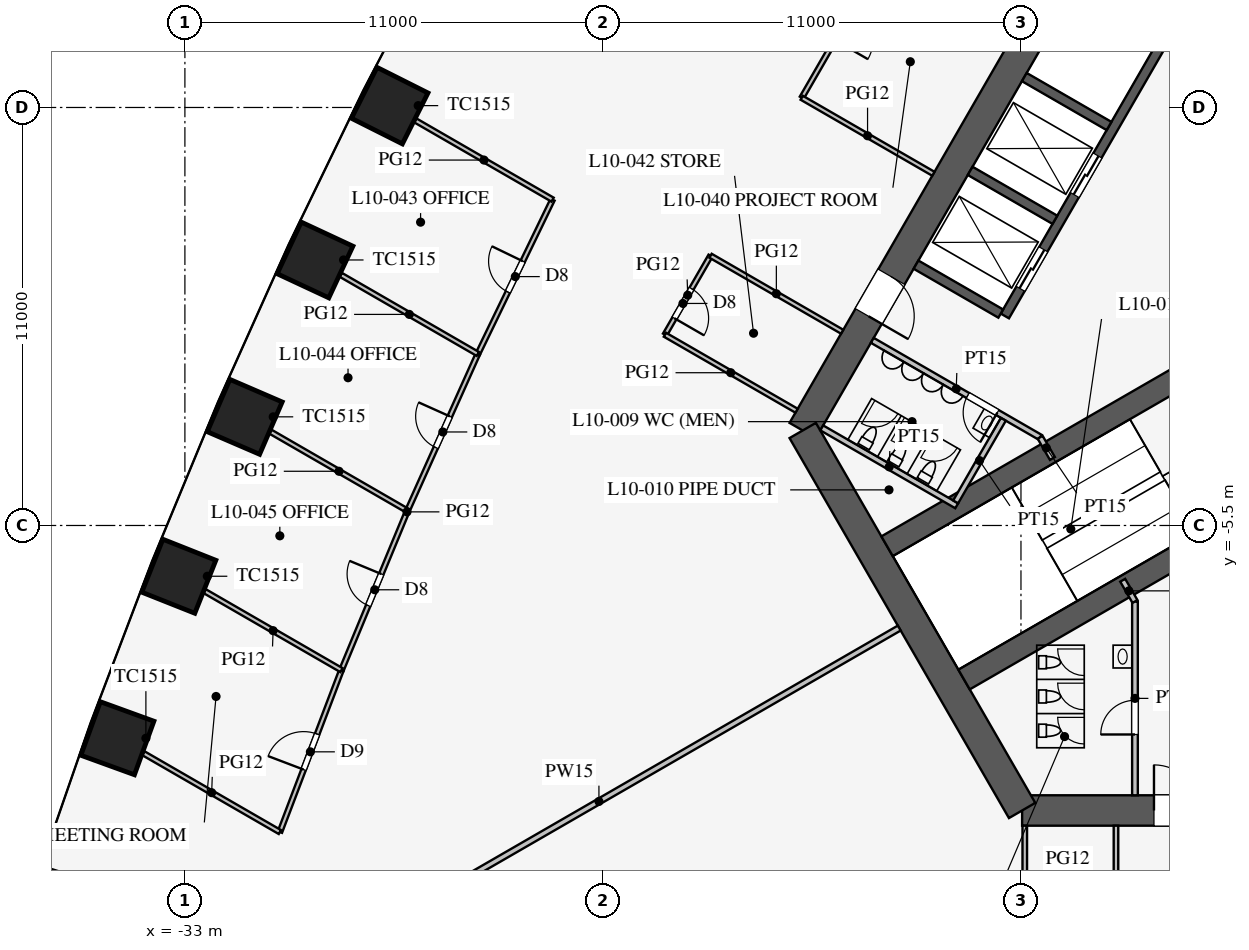
"""IFC4 building model, lengths in metres.
Left out: names, types, materials, properties, quantities, classifications, styles, units other than length and angle.
Written with IfcOpenShell. Run it as: python <this file> out.ifc"""

import sys

from ifc_helpers import new_model, si_unit, direction, frame, frame_2d, origin, origin_2d, place, context, subcontext, project, spatial, rectangle, extrude, element, fill, save


model = new_model("IFC4")
c1 = context("Model", 3, precision=1e-05, world=origin(), true_north=direction((0.0, 1.0)))
c2 = subcontext(c1, "Body", "Model", "MODEL_VIEW")
j1 = project(units=[si_unit("LENGTHUNIT", "METRE"), si_unit("PLANEANGLEUNIT", "RADIAN")], contexts=[c1])
p1 = place(None, origin())
s1 = spatial("IfcSite", under=j1, at=p1, CompositionType="ELEMENT")
p2 = place(p1, origin())
s2 = spatial("IfcBuilding", under=s1, at=p2, CompositionType="ELEMENT")
p3 = place(p2, frame((0.0, 0.0, 45.9)))
s3 = spatial("IfcBuildingStorey", under=s2, at=p3, CompositionType="ELEMENT", Elevation=45.9)
for number, where, z_axis, x_axis in (
    (1, (-27.611, 5.549, 0.0), (0.0, 0.0, 1.0), (-0.449, -0.894, 0.0)),
    (2, (-29.576, 1.487, 0.0), (0.0, 0.0, 1.0), (-0.423, -0.906, 0.0)),
    (3, (-31.426, -2.641, 0.0), (0.0, 0.0, 1.0), (-0.396, -0.918, 0.0)),
    (4, (-33.16, -6.836, 0.0), (0.0, 0.0, 1.0), (-0.369, -0.929, 0.0)),
    (5, (-34.776, -11.099, 0.0), (0.0, 0.0, 1.0), (-0.342, -0.94, 0.0)),
    (6, (-36.262, -15.438, 0.0), (0.0, 0.0, 1.0), (-0.3, -0.954, 0.0)),
):
    element("IfcColumn", number, at=place(p3, frame(where, z_axis=z_axis, x_axis=x_axis)), inside=s3, PredefinedType="COLUMN", context=c2, shape_type="SweptSolid", body=[
        extrude(rectangle(XDim=1.5, YDim=1.5, at=origin_2d()), origin(), (0.0, 0.0, 1.0), 4.2),
    ])
p4 = place(p3, frame((-10.97, -13.0, 0.0), z_axis=(0.0, 0.0, 1.0), x_axis=(1.0, 0.0, 0.0)))
e7 = element("IfcWall", 7, at=p4, inside=s3, PredefinedType="SHEAR", context=c2, shape_type="SweptSolid", body=[
    extrude(rectangle(XDim=21.939, YDim=0.8, at=frame_2d((10.97, 0.0))), origin(), (0.0, 0.0, 1.0), 4.2),
])
p5 = place(p4, frame((17.27, 0.0, 0.0)))
e8 = element("IfcOpeningElement", 8, at=p5, cuts=e7, PredefinedType="OPENING", context=c2, shape_type="SweptSolid", body=[
    extrude(rectangle(XDim=1.2, YDim=2.1, at=frame_2d((0.6, 1.05))), frame((0.0, 0.41, 0.0), z_axis=(0.0, -1.0, 0.0), x_axis=(1.0, 0.0, 0.0)), (0.0, 0.0, 1.0), 0.82),
])
p6 = place(p4, frame((3.47, 0.0, 0.0)))
e9 = element("IfcOpeningElement", 9, at=p6, cuts=e7, PredefinedType="OPENING", context=c2, shape_type="SweptSolid", body=[
    extrude(rectangle(XDim=1.2, YDim=2.1, at=frame_2d((0.6, 1.05))), frame((0.0, 0.41, 0.0), z_axis=(0.0, -1.0, 0.0), x_axis=(1.0, 0.0, 0.0)), (0.0, 0.0, 1.0), 0.82),
])
p7 = place(p3, frame((-5.773, 16.0, 0.0), z_axis=(0.0, 0.0, 1.0), x_axis=(-0.500002442456, -0.866023993627, 0.0)))
e10 = element("IfcWall", 10, at=p7, inside=s3, PredefinedType="SHEAR", context=c2, shape_type="SweptSolid", body=[
    extrude(rectangle(XDim=21.939, YDim=0.8, at=frame_2d((10.97, 0.0))), origin(), (0.0, 0.0, 1.0), 4.2),
])
p8 = place(p7, frame((17.27, 0.0, 0.0)))
e11 = element("IfcOpeningElement", 11, at=p8, cuts=e10, PredefinedType="OPENING", context=c2, shape_type="SweptSolid", body=[
    extrude(rectangle(XDim=1.2, YDim=2.1, at=frame_2d((0.6, 1.05))), frame((0.0, 0.41, 0.0), z_axis=(0.0, -1.0, 0.0), x_axis=(1.0, 0.0, 0.0)), (0.0, 0.0, 1.0), 0.82),
])
p9 = place(p7, frame((3.47, 0.0, 0.0)))
e12 = element("IfcOpeningElement", 12, at=p9, cuts=e10, PredefinedType="OPENING", context=c2, shape_type="SweptSolid", body=[
    extrude(rectangle(XDim=1.2, YDim=2.1, at=frame_2d((0.6, 1.05))), frame((0.0, 0.41, 0.0), z_axis=(0.0, -1.0, 0.0), x_axis=(1.0, 0.0, 0.0)), (0.0, 0.0, 1.0), 0.82),
])
p10 = place(p3, frame((-16.743, -3.0, 0.0), z_axis=(0.0, 0.0, 1.0), x_axis=(0.499995765644, -0.866027848477, 0.0)))
e13 = element("IfcWall", 13, at=p10, inside=s3, PredefinedType="SHEAR", context=c2, shape_type="SweptSolid", body=[
    extrude(rectangle(XDim=11.547, YDim=0.8, at=frame_2d((5.773, 0.0))), origin(), (0.0, 0.0, 1.0), 4.2),
])
p11 = place(p3, frame((-5.724, 9.886, 0.0), z_axis=(0.0, 0.0, 1.0), x_axis=(-0.500001763848, -0.866024385424, 0.0)))
e14 = element("IfcWall", 14, at=p11, inside=s3, PredefinedType="SHEAR", context=c2, shape_type="SweptSolid", body=[
    extrude(rectangle(XDim=11.4, YDim=0.25, at=frame_2d((5.7, 0.0))), origin(), (0.0, 0.0, 1.0), 4.2),
])
p12 = place(p11, frame((6.525, 0.0, 0.0)))
e15 = element("IfcOpeningElement", 15, at=p12, cuts=e14, PredefinedType="OPENING", context=c2, shape_type="SweptSolid", body=[
    extrude(rectangle(XDim=1.2, YDim=2.2, at=frame_2d((0.6, 1.1))), frame((0.0, 0.135, 0.0), z_axis=(0.0, -1.0, 0.0), x_axis=(1.0, 0.0, 0.0)), (0.0, 0.0, 1.0), 0.27),
])
p13 = place(p11, frame((9.375, 0.0, 0.0)))
e16 = element("IfcOpeningElement", 16, at=p13, cuts=e14, PredefinedType="OPENING", context=c2, shape_type="SweptSolid", body=[
    extrude(rectangle(XDim=1.2, YDim=2.2, at=frame_2d((0.6, 1.1))), frame((0.0, 0.135, 0.0), z_axis=(0.0, -1.0, 0.0), x_axis=(1.0, 0.0, 0.0)), (0.0, 0.0, 1.0), 0.27),
])
for number, where, z_axis, x_axis in (
    (17, (-8.682, 5.012, 0.0), (0.0, 0.0, 1.0), (-0.866, 0.5, 0.0)),
    (18, (-10.107, 2.544, 0.0), (0.0, 0.0, 1.0), (-0.866, 0.5, 0.0)),
    (19, (-11.532, 0.076, 0.0), (0.0, 0.0, 1.0), (-0.866, 0.5, 0.0)),
):
    element("IfcWall", number, at=place(p3, frame(where, z_axis=z_axis, x_axis=x_axis)), inside=s3, PredefinedType="SHEAR", context=c2, shape_type="SweptSolid", body=[
        extrude(rectangle(XDim=2.575, YDim=0.25, at=frame_2d((1.288, 0.0))), origin(), (0.0, 0.0, 1.0), 4.2),
    ])
for number, where, z_axis, x_axis in (
    (20, (-6.663, -1.509, 0.0), (0.0, 0.0, 1.0), (-0.866, -0.5, 0.0)),
    (21, (-4.638, -5.016, 0.0), (0.0, 0.0, 1.0), (-0.866, -0.5, 0.0)),
):
    element("IfcWall", number, at=place(p3, frame(where, z_axis=z_axis, x_axis=x_axis)), inside=s3, PredefinedType="SHEAR", context=c2, shape_type="SweptSolid", body=[
        extrude(rectangle(XDim=9.075, YDim=0.6, at=frame_2d((4.538, 0.0))), origin(), (0.0, 0.0, 1.0), 4.2),
    ])
p14 = place(p3, frame((-8.0, -7.5, 0.0), z_axis=(0.0, 0.0, 1.0), x_axis=(0.0, -1.0, 0.0)))
e22 = element("IfcWall", 22, at=p14, inside=s3, PredefinedType="PARTITIONING", context=c2, shape_type="SweptSolid", body=[
    extrude(rectangle(XDim=5.1, YDim=0.15, at=frame_2d((2.55, 0.0))), origin(), (0.0, 0.0, 1.0), 4.0),
])
p15 = place(p14, frame((2.6, 0.0, 0.0)))
e23 = element("IfcOpeningElement", 23, at=p15, cuts=e22, PredefinedType="OPENING", context=c2, shape_type="SweptSolid", body=[
    extrude(rectangle(XDim=0.9, YDim=2.1, at=frame_2d((0.45, 1.05))), frame((0.0, 0.085, 0.0), z_axis=(0.0, -1.0, 0.0), x_axis=(1.0, 0.0, 0.0)), (0.0, 0.0, 1.0), 0.17),
])
p16 = place(p3, frame((-10.495, -3.178, 0.0), z_axis=(0.0, 0.0, 1.0), x_axis=(-0.86602216432, 0.500005610874, 0.0)))
e24 = element("IfcWall", 24, at=p16, inside=s3, PredefinedType="PARTITIONING", context=c2, shape_type="SweptSolid", body=[
    extrude(rectangle(XDim=5.1, YDim=0.15, at=frame_2d((2.55, 0.0))), origin(), (0.0, 0.0, 1.0), 4.0),
])
p17 = place(p16, frame((1.3, 0.0, 0.0)))
e25 = element("IfcOpeningElement", 25, at=p17, cuts=e24, PredefinedType="OPENING", context=c2, shape_type="SweptSolid", body=[
    extrude(rectangle(XDim=0.9, YDim=2.1, at=frame_2d((0.45, 1.05))), frame((0.0, 0.085, 0.0), z_axis=(0.0, -1.0, 0.0), x_axis=(1.0, 0.0, 0.0)), (0.0, 0.0, 1.0), 0.17),
])
for number, where, z_axis, x_axis in (
    (26, (-10.495, -3.178, 0.0), (0.0, 0.0, 1.0), (0.5, -0.866, 0.0)),
    (27, (-8.0, -7.5, 0.0), (0.0, 0.0, 1.0), (-0.5, 0.866, 0.0)),
):
    element("IfcWall", number, at=place(p3, frame(where, z_axis=z_axis, x_axis=x_axis)), inside=s3, PredefinedType="PARTITIONING", context=c2, shape_type="SweptSolid", body=[
        extrude(rectangle(XDim=0.645, YDim=0.15, at=frame_2d((0.323, 0.0))), origin(), (0.0, 0.0, 1.0), 4.0),
    ])
p18 = place(p3, frame((-12.691, -4.982, 0.0), z_axis=(0.0, 0.0, 1.0), x_axis=(-0.8660249478, 0.500000789788, 0.0)))
e28 = element("IfcWall", 28, at=p18, inside=s3, PredefinedType="PARTITIONING", context=c2, shape_type="SweptSolid", body=[
    extrude(rectangle(XDim=4.1, YDim=0.15, at=frame_2d((2.05, 0.0))), origin(), (0.0, 0.0, 1.0), 4.0),
])
p19 = place(p3, frame((-11.464, -2.706, 0.0), z_axis=(0.0, 0.0, 1.0), x_axis=(-0.50001992892, -0.866013897511, 0.0)))
e29 = element("IfcWall", 29, at=p19, inside=s3, PredefinedType="PARTITIONING", context=c2, shape_type="SweptSolid", body=[
    extrude(rectangle(XDim=2.51, YDim=0.15, at=frame_2d((1.255, 0.0))), origin(), (0.0, 0.0, 1.0), 4.0),
])
p20 = place(p3, frame((-14.203, -8.2, 0.0), z_axis=(0.0, 0.0, 1.0), x_axis=(-0.866024965723, -0.500000758745, 0.0)))
e30 = element("IfcWall", 30, at=p20, inside=s3, PredefinedType="PARTITIONING", context=c2, shape_type="SweptSolid", body=[
    extrude(rectangle(XDim=18.25, YDim=0.15, at=frame_2d((9.125, 0.0))), origin(), (0.0, 0.0, 1.0), 2.3),
])
for number, where, z_axis, x_axis in (
    (31, (-10.9, -13.4, 0.0), (0.0, 0.0, 1.0), (0.0, -1.0, 0.0)),
    (32, (-8.5, -13.4, 0.0), (0.0, 0.0, 1.0), (0.0, -1.0, 0.0)),
):
    element("IfcWall", number, at=place(p3, frame(where, z_axis=z_axis, x_axis=x_axis)), inside=s3, PredefinedType="PARTITIONING", context=c2, shape_type="SweptSolid", body=[
        extrude(rectangle(XDim=4.0, YDim=0.12, at=frame_2d((2.0, 0.0))), origin(), (0.0, 0.0, 1.0), 2.9),
    ])
p21 = place(p3, frame((-19.169, 1.599, 0.0), z_axis=(0.0, 0.0, 1.0), x_axis=(-0.499957262057, -0.866050077142, 0.0)))
e33 = element("IfcWall", 33, at=p21, inside=s3, PredefinedType="PARTITIONING", context=c2, shape_type="SweptSolid", body=[
    extrude(rectangle(XDim=2.4, YDim=0.12, at=frame_2d((1.2, 0.0))), origin(), (0.0, 0.0, 1.0), 2.9),
])
p22 = place(p21, frame((1.0, 0.0, 0.15)))
e34 = element("IfcOpeningElement", 34, at=p22, cuts=e33, PredefinedType="OPENING", context=c2, shape_type="SweptSolid", body=[
    extrude(rectangle(XDim=0.9, YDim=2.1, at=frame_2d((0.45, 1.05))), frame((0.0, 0.07, 0.0), z_axis=(0.0, -1.0, 0.0), x_axis=(1.0, 0.0, 0.0)), (0.0, 0.0, 1.0), 0.14),
])
p23 = place(p3, frame((-14.519, 9.653, 0.0), z_axis=(0.0, 0.0, 1.0), x_axis=(-0.500013631625, -0.866017533419, 0.0)))
e35 = element("IfcWall", 35, at=p23, inside=s3, PredefinedType="PARTITIONING", context=c2, shape_type="SweptSolid", body=[
    extrude(rectangle(XDim=4.5, YDim=0.12, at=frame_2d((2.25, 0.0))), origin(), (0.0, 0.0, 1.0), 2.9),
])
p24 = place(p23, frame((1.75, 0.0, 0.15)))
e36 = element("IfcOpeningElement", 36, at=p24, cuts=e35, PredefinedType="OPENING", context=c2, shape_type="SweptSolid", body=[
    extrude(rectangle(XDim=1.0, YDim=2.1, at=frame_2d((0.5, 1.05))), frame((0.0, 0.07, 0.0), z_axis=(0.0, -1.0, 0.0), x_axis=(1.0, 0.0, 0.0)), (0.0, 0.0, 1.0), 0.14),
])
for number, where, z_axis, x_axis in (
    (37, (-16.905, -2.48, 0.0), (0.0, 0.0, 1.0), (-0.866, 0.5, 0.0)),
    (38, (-13.305, 3.756, 0.0), (0.0, 0.0, 1.0), (-0.866, 0.5, 0.0)),
    (39, (-15.705, -0.401, 0.0), (0.0, 0.0, 1.0), (-0.866, 0.5, 0.0)),
):
    element("IfcWall", number, at=place(p3, frame(where, z_axis=z_axis, x_axis=x_axis)), inside=s3, PredefinedType="PARTITIONING", context=c2, shape_type="SweptSolid", body=[
        extrude(rectangle(XDim=4.0, YDim=0.12, at=frame_2d((2.0, 0.0))), origin(), (0.0, 0.0, 1.0), 2.9),
    ])
p25 = place(p3, frame((-25.292, -0.986, 0.0), z_axis=(0.0, 0.0, 1.0), x_axis=(-0.409451055745, -0.912332084796, 0.0)))
e40 = element("IfcWall", 40, at=p25, inside=s3, PredefinedType="PARTITIONING", context=c2, shape_type="SweptSolid", body=[
    extrude(rectangle(XDim=4.523, YDim=0.12, at=frame_2d((2.262, 0.0))), origin(), (0.0, 0.0, 1.0), 2.9),
])
p26 = place(p25, frame((1.8, 0.0, 0.15)))
e41 = element("IfcOpeningElement", 41, at=p26, cuts=e40, PredefinedType="OPENING", context=c2, shape_type="SweptSolid", body=[
    extrude(rectangle(XDim=0.9, YDim=2.1, at=frame_2d((0.45, 1.05))), frame((0.0, 0.07, 0.0), z_axis=(0.0, -1.0, 0.0), x_axis=(1.0, 0.0, 0.0)), (0.0, 0.0, 1.0), 0.14),
])
p27 = place(p3, frame((-27.144, -5.113, 0.0), z_axis=(0.0, 0.0, 1.0), x_axis=(-0.382594071331, -0.923916542001, 0.0)))
e42 = element("IfcWall", 42, at=p27, inside=s3, PredefinedType="PARTITIONING", context=c2, shape_type="SweptSolid", body=[
    extrude(rectangle(XDim=4.539, YDim=0.12, at=frame_2d((2.27, 0.0))), origin(), (0.0, 0.0, 1.0), 2.9),
])
p28 = place(p27, frame((1.8, 0.0, 0.15)))
e43 = element("IfcOpeningElement", 43, at=p28, cuts=e42, PredefinedType="OPENING", context=c2, shape_type="SweptSolid", body=[
    extrude(rectangle(XDim=0.9, YDim=2.1, at=frame_2d((0.45, 1.05))), frame((0.0, 0.07, 0.0), z_axis=(0.0, -1.0, 0.0), x_axis=(1.0, 0.0, 0.0)), (0.0, 0.0, 1.0), 0.14),
])
p29 = place(p3, frame((-28.88, -9.307, 0.0), z_axis=(0.0, 0.0, 1.0), x_axis=(-0.355416187875, -0.934708154129, 0.0)))
e44 = element("IfcWall", 44, at=p29, inside=s3, PredefinedType="PARTITIONING", context=c2, shape_type="SweptSolid", body=[
    extrude(rectangle(XDim=4.558, YDim=0.12, at=frame_2d((2.279, 0.0))), origin(), (0.0, 0.0, 1.0), 2.9),
])
p30 = place(p29, frame((1.8, 0.0, 0.15)))
e45 = element("IfcOpeningElement", 45, at=p30, cuts=e44, PredefinedType="OPENING", context=c2, shape_type="SweptSolid", body=[
    extrude(rectangle(XDim=1.0, YDim=2.1, at=frame_2d((0.5, 1.05))), frame((0.0, 0.07, 0.0), z_axis=(0.0, -1.0, 0.0), x_axis=(1.0, 0.0, 0.0)), (0.0, 0.0, 1.0), 0.14),
])
p31 = place(p3, frame((-23.325, 3.074, 0.0), z_axis=(0.0, 0.0, 1.0), x_axis=(-0.435857917556, -0.900015486369, 0.0)))
e46 = element("IfcWall", 46, at=p31, inside=s3, PredefinedType="PARTITIONING", context=c2, shape_type="SweptSolid", body=[
    extrude(rectangle(XDim=4.512, YDim=0.12, at=frame_2d((2.256, 0.0))), origin(), (0.0, 0.0, 1.0), 2.9),
])
p32 = place(p31, frame((1.8, 0.0, 0.15)))
e47 = element("IfcOpeningElement", 47, at=p32, cuts=e46, PredefinedType="OPENING", context=c2, shape_type="SweptSolid", body=[
    extrude(rectangle(XDim=0.9, YDim=2.1, at=frame_2d((0.45, 1.05))), frame((0.0, 0.07, 0.0), z_axis=(0.0, -1.0, 0.0), x_axis=(1.0, 0.0, 0.0)), (0.0, 0.0, 1.0), 0.14),
])
p33 = place(p3, frame((-25.292, -0.986, 0.0), z_axis=(0.0, 0.0, 1.0), x_axis=(-0.866011781705, 0.500023593391, 0.0)))
e48 = element("IfcWall", 48, at=p33, inside=s3, PredefinedType="PARTITIONING", context=c2, shape_type="SweptSolid", body=[
    extrude(rectangle(XDim=4.164, YDim=0.12, at=frame_2d((2.082, 0.0))), origin(), (0.0, 0.0, 1.0), 2.9),
])
p34 = place(p3, frame((-27.144, -5.113, 0.0), z_axis=(0.0, 0.0, 1.0), x_axis=(-0.866031144707, 0.499990056298, 0.0)))
e49 = element("IfcWall", 49, at=p34, inside=s3, PredefinedType="PARTITIONING", context=c2, shape_type="SweptSolid", body=[
    extrude(rectangle(XDim=4.159, YDim=0.12, at=frame_2d((2.08, 0.0))), origin(), (0.0, 0.0, 1.0), 2.9),
])
p35 = place(p3, frame((-28.88, -9.307, 0.0), z_axis=(0.0, 0.0, 1.0), x_axis=(-0.866027987673, 0.499995524547, 0.0)))
e50 = element("IfcWall", 50, at=p35, inside=s3, PredefinedType="PARTITIONING", context=c2, shape_type="SweptSolid", body=[
    extrude(rectangle(XDim=4.153, YDim=0.12, at=frame_2d((2.077, 0.0))), origin(), (0.0, 0.0, 1.0), 2.9),
])
p36 = place(p3, frame((-30.5, -13.567, 0.0), z_axis=(0.0, 0.0, 1.0), x_axis=(-0.86602376425, 0.500002839747, 0.0)))
e51 = element("IfcWall", 51, at=p36, inside=s3, PredefinedType="PARTITIONING", context=c2, shape_type="SweptSolid", body=[
    extrude(rectangle(XDim=4.146, YDim=0.12, at=frame_2d((2.073, 0.0))), origin(), (0.0, 0.0, 1.0), 2.9),
])
p37 = place(p3, frame((-23.325, 3.074, 0.0), z_axis=(0.0, 0.0, 1.0), x_axis=(-0.866009971343, 0.50002672882, 0.0)))
e52 = element("IfcWall", 52, at=p37, inside=s3, PredefinedType="PARTITIONING", context=c2, shape_type="SweptSolid", body=[
    extrude(rectangle(XDim=4.167, YDim=0.12, at=frame_2d((2.083, 0.0))), origin(), (0.0, 0.0, 1.0), 2.9),
])
p38 = place(p15, frame((0.9, 0.0, 0.0), z_axis=(0.0, 0.0, 1.0), x_axis=(-1.0, 0.0, 0.0)))
e53 = element("IfcDoor", 53, at=p38, inside=s3, OperationType="SINGLE_SWING_LEFT", PredefinedType="DOOR", context=c2, shape_type="SweptSolid", body=[
    extrude(rectangle(XDim=0.9, YDim=2.1, at=frame_2d((0.45, 1.05))), frame((0.0, 0.025, 0.0), z_axis=(0.0, -1.0, 0.0), x_axis=(1.0, 0.0, 0.0)), (0.0, 0.0, 1.0), 0.05),
])
fill(e23, e53)
p39 = place(p17, origin())
e54 = element("IfcDoor", 54, at=p39, inside=s3, OperationType="SINGLE_SWING_LEFT", PredefinedType="DOOR", context=c2, shape_type="SweptSolid", body=[
    extrude(rectangle(XDim=0.9, YDim=2.1, at=frame_2d((0.45, 1.05))), frame((0.0, 0.025, 0.0), z_axis=(0.0, -1.0, 0.0), x_axis=(1.0, 0.0, 0.0)), (0.0, 0.0, 1.0), 0.05),
])
fill(e25, e54)
p40 = place(p6, origin())
e55 = element("IfcDoor", 55, at=p40, inside=s3, OperationType="SINGLE_SWING_LEFT", PredefinedType="DOOR", context=c2, shape_type="SweptSolid", body=[
    extrude(rectangle(XDim=1.2, YDim=2.1, at=frame_2d((0.6, 1.05))), frame((0.0, 0.025, 0.0), z_axis=(0.0, -1.0, 0.0), x_axis=(1.0, 0.0, 0.0)), (0.0, 0.0, 1.0), 0.05),
])
fill(e9, e55)
p41 = place(p8, origin())
e56 = element("IfcDoor", 56, at=p41, inside=s3, OperationType="SINGLE_SWING_RIGHT", PredefinedType="DOOR", context=c2, shape_type="SweptSolid", body=[
    extrude(rectangle(XDim=1.2, YDim=2.1, at=frame_2d((0.6, 1.05))), frame((0.0, 0.025, 0.0), z_axis=(0.0, -1.0, 0.0), x_axis=(1.0, 0.0, 0.0)), (0.0, 0.0, 1.0), 0.05),
])
fill(e11, e56)
p42 = place(p22, origin())
e57 = element("IfcDoor", 57, at=p42, inside=s3, OperationType="SINGLE_SWING_RIGHT", PredefinedType="DOOR", context=c2, shape_type="SweptSolid", body=[
    extrude(rectangle(XDim=0.9, YDim=2.1, at=frame_2d((0.45, 1.05))), frame((0.0, 0.025, 0.0), z_axis=(0.0, -1.0, 0.0), x_axis=(1.0, 0.0, 0.0)), (0.0, 0.0, 1.0), 0.05),
])
fill(e34, e57)
p43 = place(p32, frame((0.9, 0.0, 0.0), z_axis=(0.0, 0.0, 1.0), x_axis=(-1.0, 0.0, 0.0)))
e58 = element("IfcDoor", 58, at=p43, inside=s3, OperationType="SINGLE_SWING_RIGHT", PredefinedType="DOOR", context=c2, shape_type="SweptSolid", body=[
    extrude(rectangle(XDim=0.9, YDim=2.1, at=frame_2d((0.45, 1.05))), frame((0.0, 0.025, 0.0), z_axis=(0.0, -1.0, 0.0), x_axis=(1.0, 0.0, 0.0)), (0.0, 0.0, 1.0), 0.05),
])
fill(e47, e58)
p44 = place(p26, frame((0.9, 0.0, 0.0), z_axis=(0.0, 0.0, 1.0), x_axis=(-1.0, 0.0, 0.0)))
e59 = element("IfcDoor", 59, at=p44, inside=s3, OperationType="SINGLE_SWING_RIGHT", PredefinedType="DOOR", context=c2, shape_type="SweptSolid", body=[
    extrude(rectangle(XDim=0.9, YDim=2.1, at=frame_2d((0.45, 1.05))), frame((0.0, 0.025, 0.0), z_axis=(0.0, -1.0, 0.0), x_axis=(1.0, 0.0, 0.0)), (0.0, 0.0, 1.0), 0.05),
])
fill(e41, e59)
p45 = place(p28, frame((0.9, 0.0, 0.0), z_axis=(0.0, 0.0, 1.0), x_axis=(-1.0, 0.0, 0.0)))
e60 = element("IfcDoor", 60, at=p45, inside=s3, OperationType="SINGLE_SWING_RIGHT", PredefinedType="DOOR", context=c2, shape_type="SweptSolid", body=[
    extrude(rectangle(XDim=0.9, YDim=2.1, at=frame_2d((0.45, 1.05))), frame((0.0, 0.025, 0.0), z_axis=(0.0, -1.0, 0.0), x_axis=(1.0, 0.0, 0.0)), (0.0, 0.0, 1.0), 0.05),
])
fill(e43, e60)
p46 = place(p30, frame((1.0, 0.0, 0.0), z_axis=(0.0, 0.0, 1.0), x_axis=(-1.0, 0.0, 0.0)))
e61 = element("IfcDoor", 61, at=p46, inside=s3, OperationType="SINGLE_SWING_LEFT", PredefinedType="DOOR", context=c2, shape_type="SweptSolid", body=[
    extrude(rectangle(XDim=1.0, YDim=2.1, at=frame_2d((0.5, 1.05))), frame((0.0, 0.025, 0.0), z_axis=(0.0, -1.0, 0.0), x_axis=(1.0, 0.0, 0.0)), (0.0, 0.0, 1.0), 0.05),
])
fill(e45, e61)
p47 = place(p12, origin())
e62 = element("IfcDoor", 62, at=p47, inside=s3, OperationType="DOUBLE_DOOR_SLIDING", PredefinedType="DOOR", context=c2, shape_type="SweptSolid", body=[
    extrude(rectangle(XDim=1.2, YDim=2.2, at=frame_2d((0.6, 1.1))), frame((0.0, 0.025, 0.0), z_axis=(0.0, -1.0, 0.0), x_axis=(1.0, 0.0, 0.0)), (0.0, 0.0, 1.0), 0.05),
])
fill(e15, e62)
p48 = place(p13, origin())
e63 = element("IfcDoor", 63, at=p48, inside=s3, OperationType="DOUBLE_DOOR_SLIDING", PredefinedType="DOOR", context=c2, shape_type="SweptSolid", body=[
    extrude(rectangle(XDim=1.2, YDim=2.2, at=frame_2d((0.6, 1.1))), frame((0.0, 0.025, 0.0), z_axis=(0.0, -1.0, 0.0), x_axis=(1.0, 0.0, 0.0)), (0.0, 0.0, 1.0), 0.05),
])
fill(e16, e63)
save(model, sys.argv[1])
